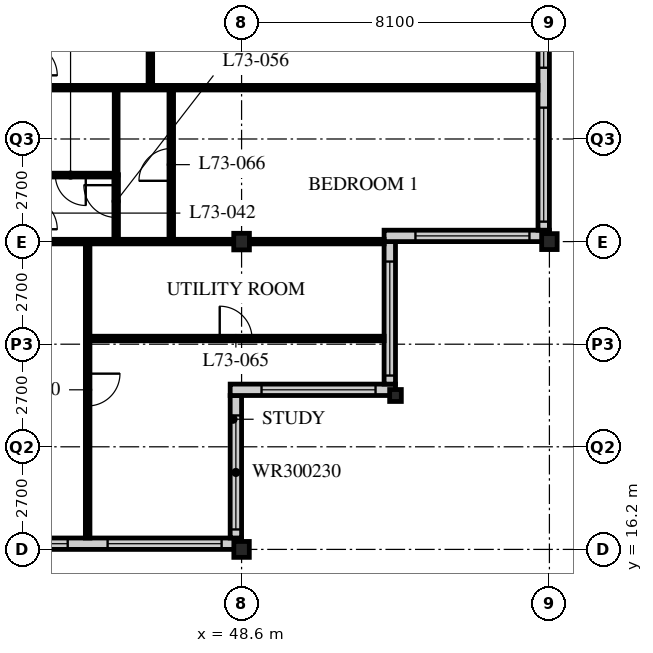
"""IFC4 building model, lengths in metres.
Left out: names, types, materials, properties, quantities, classifications, styles, units other than length and angle.
Written with IfcOpenShell. Run it as: python <this file> out.ifc"""

import sys

from ifc_helpers import new_model, si_unit, direction, frame, frame_2d, origin, origin_2d, place, context, subcontext, project, spatial, rectangle, i_section, extrude, element, fill, save


model = new_model("IFC4")
c1 = context("Model", 3, precision=1e-05, world=origin(), true_north=direction((0.0, 1.0)))
c2 = subcontext(c1, "Body", "Model", "MODEL_VIEW")
j1 = project(units=[si_unit("LENGTHUNIT", "METRE"), si_unit("PLANEANGLEUNIT", "RADIAN")], contexts=[c1])
p1 = place(None, origin())
s1 = spatial("IfcSite", under=j1, at=p1, CompositionType="ELEMENT")
p2 = place(p1, origin())
s2 = spatial("IfcBuilding", under=s1, at=p2, CompositionType="ELEMENT")
p3 = place(p2, frame((0.0, 0.0, 285.3)))
s3 = spatial("IfcBuildingStorey", under=s2, at=p3, CompositionType="ELEMENT", Elevation=285.3)
p4 = place(p3, frame((48.6, 16.2, 0.0), z_axis=(0.0, 0.0, 1.0), x_axis=(1.0, 0.0, 0.0)))
e1 = element("IfcColumn", 1, at=p4, inside=s3, PredefinedType="COLUMN", context=c2, shape_type="SweptSolid", body=[
    extrude(i_section(OverallWidth=0.407, OverallDepth=0.419, WebThickness=0.031, FlangeThickness=0.049, FilletRadius=0.015, at=origin_2d()), origin(), (0.0, 0.0, 1.0), 3.9),
])
p5 = place(p3, frame((48.6, 24.3, 0.0), z_axis=(0.0, 0.0, 1.0), x_axis=(1.0, 0.0, 0.0)))
e2 = element("IfcColumn", 2, at=p5, inside=s3, PredefinedType="COLUMN", context=c2, shape_type="SweptSolid", body=[
    extrude(i_section(OverallWidth=0.412, OverallDepth=0.437, WebThickness=0.036, FlangeThickness=0.058, FilletRadius=0.015, at=origin_2d()), origin(), (0.0, 0.0, 1.0), 3.9),
])
p6 = place(p3, frame((52.65, 20.25, 0.0), z_axis=(0.0, 0.0, 1.0), x_axis=(1.0, 0.0, 0.0)))
e3 = element("IfcColumn", 3, at=p6, inside=s3, PredefinedType="COLUMN", context=c2, shape_type="SweptSolid", body=[
    extrude(i_section(OverallWidth=0.307, OverallDepth=0.314, WebThickness=0.012, FlangeThickness=0.019, FilletRadius=0.015, at=origin_2d()), origin(), (0.0, 0.0, 1.0), 3.9),
])
p7 = place(p3, frame((56.7, 24.3, 0.0), z_axis=(0.0, 0.0, 1.0), x_axis=(1.0, 0.0, 0.0)))
e4 = element("IfcColumn", 4, at=p7, inside=s3, PredefinedType="COLUMN", context=c2, shape_type="SweptSolid", body=[
    extrude(i_section(OverallWidth=0.407, OverallDepth=0.419, WebThickness=0.031, FlangeThickness=0.049, FilletRadius=0.015, at=origin_2d()), origin(), (0.0, 0.0, 1.0), 3.9),
])
p8 = place(p3, frame((8.4, 16.35, 0.0), z_axis=(0.0, 0.0, 1.0), x_axis=(1.0, 0.0, 0.0)))
e5 = element("IfcWall", 5, at=p8, inside=s3, PredefinedType="SOLIDWALL", context=c2, shape_type="SweptSolid", body=[
    extrude(rectangle(XDim=40.2, YDim=0.3, at=frame_2d((20.1, 0.0))), origin(), (0.0, 0.0, 1.0), 3.69),
])
p9 = place(p8, frame((0.225, 0.0, 0.6)))
e6 = element("IfcOpeningElement", 6, at=p9, cuts=e5, PredefinedType="OPENING", context=c2, shape_type="SweptSolid", body=[
    extrude(rectangle(XDim=3.0, YDim=2.4, at=frame_2d((1.5, 1.2))), frame((0.0, 0.16, 0.0), z_axis=(0.0, -1.0, 0.0), x_axis=(1.0, 0.0, 0.0)), (0.0, 0.0, 1.0), 0.32),
])
p10 = place(p8, frame((4.275, 0.0, 0.6)))
e7 = element("IfcOpeningElement", 7, at=p10, cuts=e5, PredefinedType="OPENING", context=c2, shape_type="SweptSolid", body=[
    extrude(rectangle(XDim=3.0, YDim=2.4, at=frame_2d((1.5, 1.2))), frame((0.0, 0.16, 0.0), z_axis=(0.0, -1.0, 0.0), x_axis=(1.0, 0.0, 0.0)), (0.0, 0.0, 1.0), 0.32),
])
p11 = place(p8, frame((8.325, 0.0, 0.6)))
e8 = element("IfcOpeningElement", 8, at=p11, cuts=e5, PredefinedType="OPENING", context=c2, shape_type="SweptSolid", body=[
    extrude(rectangle(XDim=3.0, YDim=2.4, at=frame_2d((1.5, 1.2))), frame((0.0, 0.16, 0.0), z_axis=(0.0, -1.0, 0.0), x_axis=(1.0, 0.0, 0.0)), (0.0, 0.0, 1.0), 0.32),
])
p12 = place(p8, frame((12.375, 0.0, 0.6)))
e9 = element("IfcOpeningElement", 9, at=p12, cuts=e5, PredefinedType="OPENING", context=c2, shape_type="SweptSolid", body=[
    extrude(rectangle(XDim=3.0, YDim=2.4, at=frame_2d((1.5, 1.2))), frame((0.0, 0.16, 0.0), z_axis=(0.0, -1.0, 0.0), x_axis=(1.0, 0.0, 0.0)), (0.0, 0.0, 1.0), 0.32),
])
p13 = place(p8, frame((16.425, 0.0, 0.6)))
e10 = element("IfcOpeningElement", 10, at=p13, cuts=e5, PredefinedType="OPENING", context=c2, shape_type="SweptSolid", body=[
    extrude(rectangle(XDim=3.0, YDim=2.4, at=frame_2d((1.5, 1.2))), frame((0.0, 0.16, 0.0), z_axis=(0.0, -1.0, 0.0), x_axis=(1.0, 0.0, 0.0)), (0.0, 0.0, 1.0), 0.32),
])
p14 = place(p8, frame((20.475, 0.0, 0.6)))
e11 = element("IfcOpeningElement", 11, at=p14, cuts=e5, PredefinedType="OPENING", context=c2, shape_type="SweptSolid", body=[
    extrude(rectangle(XDim=3.0, YDim=2.4, at=frame_2d((1.5, 1.2))), frame((0.0, 0.16, 0.0), z_axis=(0.0, -1.0, 0.0), x_axis=(1.0, 0.0, 0.0)), (0.0, 0.0, 1.0), 0.32),
])
p15 = place(p8, frame((24.525, 0.0, 0.6)))
e12 = element("IfcOpeningElement", 12, at=p15, cuts=e5, PredefinedType="OPENING", context=c2, shape_type="SweptSolid", body=[
    extrude(rectangle(XDim=3.0, YDim=2.4, at=frame_2d((1.5, 1.2))), frame((0.0, 0.16, 0.0), z_axis=(0.0, -1.0, 0.0), x_axis=(1.0, 0.0, 0.0)), (0.0, 0.0, 1.0), 0.32),
])
p16 = place(p8, frame((28.575, 0.0, 0.6)))
e13 = element("IfcOpeningElement", 13, at=p16, cuts=e5, PredefinedType="OPENING", context=c2, shape_type="SweptSolid", body=[
    extrude(rectangle(XDim=3.0, YDim=2.4, at=frame_2d((1.5, 1.2))), frame((0.0, 0.16, 0.0), z_axis=(0.0, -1.0, 0.0), x_axis=(1.0, 0.0, 0.0)), (0.0, 0.0, 1.0), 0.32),
])
p17 = place(p8, frame((32.625, 0.0, 0.6)))
e14 = element("IfcOpeningElement", 14, at=p17, cuts=e5, PredefinedType="OPENING", context=c2, shape_type="SweptSolid", body=[
    extrude(rectangle(XDim=3.0, YDim=2.4, at=frame_2d((1.5, 1.2))), frame((0.0, 0.16, 0.0), z_axis=(0.0, -1.0, 0.0), x_axis=(1.0, 0.0, 0.0)), (0.0, 0.0, 1.0), 0.32),
])
p18 = place(p8, frame((36.675, 0.0, 0.6)))
e15 = element("IfcOpeningElement", 15, at=p18, cuts=e5, PredefinedType="OPENING", context=c2, shape_type="SweptSolid", body=[
    extrude(rectangle(XDim=3.0, YDim=2.4, at=frame_2d((1.5, 1.2))), frame((0.0, 0.16, 0.0), z_axis=(0.0, -1.0, 0.0), x_axis=(1.0, 0.0, 0.0)), (0.0, 0.0, 1.0), 0.32),
])
p19 = place(p3, frame((48.45, 16.5, 0.0), z_axis=(0.0, 0.0, 1.0), x_axis=(0.0, 1.0, 0.0)))
e16 = element("IfcWall", 16, at=p19, inside=s3, PredefinedType="SOLIDWALL", context=c2, shape_type="SweptSolid", body=[
    extrude(rectangle(XDim=3.75, YDim=0.3, at=frame_2d((1.875, 0.0))), origin(), (0.0, 0.0, 1.0), 3.69),
])
p20 = place(p19, frame((0.225, 0.0, 0.6)))
e17 = element("IfcOpeningElement", 17, at=p20, cuts=e16, PredefinedType="OPENING", context=c2, shape_type="SweptSolid", body=[
    extrude(rectangle(XDim=3.0, YDim=2.3, at=frame_2d((1.5, 1.15))), frame((0.0, 0.16, 0.0), z_axis=(0.0, -1.0, 0.0), x_axis=(1.0, 0.0, 0.0)), (0.0, 0.0, 1.0), 0.32),
])
p21 = place(p3, frame((48.3, 20.4, 0.0), z_axis=(0.0, 0.0, 1.0), x_axis=(1.0, 0.0, 0.0)))
e18 = element("IfcWall", 18, at=p21, inside=s3, PredefinedType="SOLIDWALL", context=c2, shape_type="SweptSolid", body=[
    extrude(rectangle(XDim=4.35, YDim=0.3, at=frame_2d((2.175, 0.0))), origin(), (0.0, 0.0, 1.0), 3.69),
])
p22 = place(p21, frame((0.825, 0.0, 0.6)))
e19 = element("IfcOpeningElement", 19, at=p22, cuts=e18, PredefinedType="OPENING", context=c2, shape_type="SweptSolid", body=[
    extrude(rectangle(XDim=3.0, YDim=2.3, at=frame_2d((1.5, 1.15))), frame((0.0, 0.16, 0.0), z_axis=(0.0, -1.0, 0.0), x_axis=(1.0, 0.0, 0.0)), (0.0, 0.0, 1.0), 0.32),
])
p23 = place(p3, frame((52.5, 20.55, 0.0), z_axis=(0.0, 0.0, 1.0), x_axis=(0.0, 1.0, 0.0)))
e20 = element("IfcWall", 20, at=p23, inside=s3, PredefinedType="SOLIDWALL", context=c2, shape_type="SweptSolid", body=[
    extrude(rectangle(XDim=3.75, YDim=0.3, at=frame_2d((1.875, 0.0))), origin(), (0.0, 0.0, 1.0), 3.69),
])
p24 = place(p23, frame((0.225, 0.0, 0.6)))
e21 = element("IfcOpeningElement", 21, at=p24, cuts=e20, PredefinedType="OPENING", context=c2, shape_type="SweptSolid", body=[
    extrude(rectangle(XDim=3.0, YDim=2.3, at=frame_2d((1.5, 1.15))), frame((0.0, 0.16, 0.0), z_axis=(0.0, -1.0, 0.0), x_axis=(1.0, 0.0, 0.0)), (0.0, 0.0, 1.0), 0.32),
])
p25 = place(p3, frame((52.35, 24.45, 0.0), z_axis=(0.0, 0.0, 1.0), x_axis=(1.0, 0.0, 0.0)))
e22 = element("IfcWall", 22, at=p25, inside=s3, PredefinedType="SOLIDWALL", context=c2, shape_type="SweptSolid", body=[
    extrude(rectangle(XDim=4.35, YDim=0.3, at=frame_2d((2.175, 0.0))), origin(), (0.0, 0.0, 1.0), 3.69),
])
p26 = place(p25, frame((0.825, 0.0, 0.6)))
e23 = element("IfcOpeningElement", 23, at=p26, cuts=e22, PredefinedType="OPENING", context=c2, shape_type="SweptSolid", body=[
    extrude(rectangle(XDim=3.0, YDim=2.3, at=frame_2d((1.5, 1.15))), frame((0.0, 0.16, 0.0), z_axis=(0.0, -1.0, 0.0), x_axis=(1.0, 0.0, 0.0)), (0.0, 0.0, 1.0), 0.32),
])
p27 = place(p3, frame((56.55, 24.6, 0.0), z_axis=(0.0, 0.0, 1.0), x_axis=(0.0, 1.0, 0.0)))
e24 = element("IfcWall", 24, at=p27, inside=s3, PredefinedType="SOLIDWALL", context=c2, shape_type="SweptSolid", body=[
    extrude(rectangle(XDim=32.1, YDim=0.3, at=frame_2d((16.05, 0.0))), origin(), (0.0, 0.0, 1.0), 3.69),
])
p28 = place(p27, frame((0.225, 0.0, 0.6)))
e25 = element("IfcOpeningElement", 25, at=p28, cuts=e24, PredefinedType="OPENING", context=c2, shape_type="SweptSolid", body=[
    extrude(rectangle(XDim=3.0, YDim=2.4, at=frame_2d((1.5, 1.2))), frame((0.0, 0.16, 0.0), z_axis=(0.0, -1.0, 0.0), x_axis=(1.0, 0.0, 0.0)), (0.0, 0.0, 1.0), 0.32),
])
p29 = place(p27, frame((4.275, 0.0, 0.6)))
e26 = element("IfcOpeningElement", 26, at=p29, cuts=e24, PredefinedType="OPENING", context=c2, shape_type="SweptSolid", body=[
    extrude(rectangle(XDim=3.0, YDim=2.4, at=frame_2d((1.5, 1.2))), frame((0.0, 0.16, 0.0), z_axis=(0.0, -1.0, 0.0), x_axis=(1.0, 0.0, 0.0)), (0.0, 0.0, 1.0), 0.32),
])
p30 = place(p27, frame((8.325, 0.0, 0.6)))
e27 = element("IfcOpeningElement", 27, at=p30, cuts=e24, PredefinedType="OPENING", context=c2, shape_type="SweptSolid", body=[
    extrude(rectangle(XDim=3.0, YDim=2.4, at=frame_2d((1.5, 1.2))), frame((0.0, 0.16, 0.0), z_axis=(0.0, -1.0, 0.0), x_axis=(1.0, 0.0, 0.0)), (0.0, 0.0, 1.0), 0.32),
])
p31 = place(p27, frame((12.375, 0.0, 0.6)))
e28 = element("IfcOpeningElement", 28, at=p31, cuts=e24, PredefinedType="OPENING", context=c2, shape_type="SweptSolid", body=[
    extrude(rectangle(XDim=3.0, YDim=2.4, at=frame_2d((1.5, 1.2))), frame((0.0, 0.16, 0.0), z_axis=(0.0, -1.0, 0.0), x_axis=(1.0, 0.0, 0.0)), (0.0, 0.0, 1.0), 0.32),
])
p32 = place(p27, frame((16.425, 0.0, 0.6)))
e29 = element("IfcOpeningElement", 29, at=p32, cuts=e24, PredefinedType="OPENING", context=c2, shape_type="SweptSolid", body=[
    extrude(rectangle(XDim=3.0, YDim=2.4, at=frame_2d((1.5, 1.2))), frame((0.0, 0.16, 0.0), z_axis=(0.0, -1.0, 0.0), x_axis=(1.0, 0.0, 0.0)), (0.0, 0.0, 1.0), 0.32),
])
p33 = place(p27, frame((20.475, 0.0, 0.6)))
e30 = element("IfcOpeningElement", 30, at=p33, cuts=e24, PredefinedType="OPENING", context=c2, shape_type="SweptSolid", body=[
    extrude(rectangle(XDim=3.0, YDim=2.4, at=frame_2d((1.5, 1.2))), frame((0.0, 0.16, 0.0), z_axis=(0.0, -1.0, 0.0), x_axis=(1.0, 0.0, 0.0)), (0.0, 0.0, 1.0), 0.32),
])
p34 = place(p27, frame((24.525, 0.0, 0.6)))
e31 = element("IfcOpeningElement", 31, at=p34, cuts=e24, PredefinedType="OPENING", context=c2, shape_type="SweptSolid", body=[
    extrude(rectangle(XDim=3.0, YDim=2.4, at=frame_2d((1.5, 1.2))), frame((0.0, 0.16, 0.0), z_axis=(0.0, -1.0, 0.0), x_axis=(1.0, 0.0, 0.0)), (0.0, 0.0, 1.0), 0.32),
])
p35 = place(p27, frame((28.575, 0.0, 0.6)))
e32 = element("IfcOpeningElement", 32, at=p35, cuts=e24, PredefinedType="OPENING", context=c2, shape_type="SweptSolid", body=[
    extrude(rectangle(XDim=3.0, YDim=2.4, at=frame_2d((1.5, 1.2))), frame((0.0, 0.16, 0.0), z_axis=(0.0, -1.0, 0.0), x_axis=(1.0, 0.0, 0.0)), (0.0, 0.0, 1.0), 0.32),
])
p36 = place(p3, frame((42.9, 24.3, 0.0), z_axis=(0.0, 0.0, 1.0), x_axis=(1.0, 0.0, 0.0)))
e33 = element("IfcWall", 33, at=p36, inside=s3, PredefinedType="PARTITIONING", context=c2, shape_type="SweptSolid", body=[
    extrude(rectangle(XDim=9.45, YDim=0.12, at=frame_2d((4.725, 0.0))), origin(), (0.0, 0.0, 1.0), 3.078),
])
p37 = place(p3, frame((44.55, 16.5, 0.0), z_axis=(0.0, 0.0, 1.0), x_axis=(0.0, 1.0, 0.0)))
e34 = element("IfcWall", 34, at=p37, inside=s3, PredefinedType="PARTITIONING", context=c2, shape_type="SweptSolid", body=[
    extrude(rectangle(XDim=7.8, YDim=0.12, at=frame_2d((3.9, 0.0))), origin(), (0.0, 0.0, 1.0), 3.69),
])
p38 = place(p37, frame((3.475, 0.0, 0.0)))
e35 = element("IfcOpeningElement", 35, at=p38, cuts=e34, PredefinedType="OPENING", context=c2, shape_type="SweptSolid", body=[
    extrude(rectangle(XDim=0.85, YDim=2.1, at=frame_2d((0.425, 1.05))), frame((0.0, 0.07, 0.0), z_axis=(0.0, -1.0, 0.0), x_axis=(1.0, 0.0, 0.0)), (0.0, 0.0, 1.0), 0.14),
])
p39 = place(p3, frame((42.9, 26.05, 0.0), z_axis=(0.0, 0.0, 1.0), x_axis=(1.0, 0.0, 0.0)))
e36 = element("IfcWall", 36, at=p39, inside=s3, PredefinedType="PARTITIONING", context=c2, shape_type="SweptSolid", body=[
    extrude(rectangle(XDim=2.4, YDim=0.1, at=frame_2d((1.2, 0.0))), origin(), (0.0, 0.0, 1.0), 3.69),
])
p40 = place(p39, frame((0.8, 0.0, 0.0)))
e37 = element("IfcOpeningElement", 37, at=p40, cuts=e36, PredefinedType="OPENING", context=c2, shape_type="SweptSolid", body=[
    extrude(rectangle(XDim=0.8, YDim=2.1, at=frame_2d((0.4, 1.05))), frame((0.0, 0.06, 0.0), z_axis=(0.0, -1.0, 0.0), x_axis=(1.0, 0.0, 0.0)), (0.0, 0.0, 1.0), 0.12),
])
p41 = place(p3, frame((45.3, 26.05, 0.0), z_axis=(0.0, 0.0, 1.0), x_axis=(0.0, 1.0, 0.0)))
e38 = element("IfcWall", 38, at=p41, inside=s3, PredefinedType="PARTITIONING", context=c2, shape_type="SweptSolid", body=[
    extrude(rectangle(XDim=2.3, YDim=0.1, at=frame_2d((1.15, 0.0))), origin(), (0.0, 0.0, 1.0), 3.69),
])
p42 = place(p3, frame((42.9, 28.35, 0.0), z_axis=(0.0, 0.0, 1.0), x_axis=(1.0, 0.0, 0.0)))
e39 = element("IfcWall", 39, at=p42, inside=s3, PredefinedType="PARTITIONING", context=c2, shape_type="SweptSolid", body=[
    extrude(rectangle(XDim=13.5, YDim=0.12, at=frame_2d((6.75, 0.0))), origin(), (0.0, 0.0, 1.0), 3.69),
])
p43 = place(p3, frame((45.3, 24.3, 0.0), z_axis=(0.0, 0.0, 1.0), x_axis=(0.0, 1.0, 0.0)))
e40 = element("IfcWall", 40, at=p43, inside=s3, PredefinedType="PARTITIONING", context=c2, shape_type="SweptSolid", body=[
    extrude(rectangle(XDim=1.76, YDim=0.12, at=frame_2d((0.88, 0.0))), origin(), (0.0, 0.0, 1.0), 3.69),
])
p44 = place(p43, frame((0.635, 0.0, 0.0)))
e41 = element("IfcOpeningElement", 41, at=p44, cuts=e40, PredefinedType="OPENING", context=c2, shape_type="SweptSolid", body=[
    extrude(rectangle(XDim=0.85, YDim=2.1, at=frame_2d((0.425, 1.05))), frame((0.0, 0.07, 0.0), z_axis=(0.0, -1.0, 0.0), x_axis=(1.0, 0.0, 0.0)), (0.0, 0.0, 1.0), 0.14),
])
p45 = place(p3, frame((44.55, 21.75, 0.0), z_axis=(0.0, 0.0, 1.0), x_axis=(1.0, 0.0, 0.0)))
e42 = element("IfcWall", 42, at=p45, inside=s3, PredefinedType="PARTITIONING", context=c2, shape_type="SweptSolid", body=[
    extrude(rectangle(XDim=7.8, YDim=0.12, at=frame_2d((3.9, 0.0))), origin(), (0.0, 0.0, 1.0), 3.69),
])
p46 = place(p45, frame((3.475, 0.0, 0.0)))
e43 = element("IfcOpeningElement", 43, at=p46, cuts=e42, PredefinedType="OPENING", context=c2, shape_type="SweptSolid", body=[
    extrude(rectangle(XDim=0.85, YDim=2.1, at=frame_2d((0.425, 1.05))), frame((0.0, 0.07, 0.0), z_axis=(0.0, -1.0, 0.0), x_axis=(1.0, 0.0, 0.0)), (0.0, 0.0, 1.0), 0.14),
])
p47 = place(p3, frame((46.75, 24.3, 0.0), z_axis=(0.0, 0.0, 1.0), x_axis=(0.0, 1.0, 0.0)))
e44 = element("IfcWall", 44, at=p47, inside=s3, PredefinedType="PARTITIONING", context=c2, shape_type="SweptSolid", body=[
    extrude(rectangle(XDim=4.05, YDim=0.12, at=frame_2d((2.025, 0.0))), origin(), (0.0, 0.0, 1.0), 3.69),
])
p48 = place(p47, frame((1.6, 0.0, 0.0)))
e45 = element("IfcOpeningElement", 45, at=p48, cuts=e44, PredefinedType="OPENING", context=c2, shape_type="SweptSolid", body=[
    extrude(rectangle(XDim=0.85, YDim=2.1, at=frame_2d((0.425, 1.05))), frame((0.0, 0.07, 0.0), z_axis=(0.0, -1.0, 0.0), x_axis=(1.0, 0.0, 0.0)), (0.0, 0.0, 1.0), 0.14),
])
p49 = place(p3, frame((46.2, 28.35, 0.0), z_axis=(0.0, 0.0, 1.0), x_axis=(0.0, 1.0, 0.0)))
e46 = element("IfcWall", 46, at=p49, inside=s3, PredefinedType="PARTITIONING", context=c2, shape_type="SweptSolid", body=[
    extrude(rectangle(XDim=12.15, YDim=0.12, at=frame_2d((6.075, 0.0))), origin(), (0.0, 0.0, 1.0), 3.69),
])
p50 = place(p49, frame((1.6, 0.0, 0.0)))
e47 = element("IfcOpeningElement", 47, at=p50, cuts=e46, PredefinedType="OPENING", context=c2, shape_type="SweptSolid", body=[
    extrude(rectangle(XDim=0.85, YDim=2.1, at=frame_2d((0.425, 1.05))), frame((0.0, 0.07, 0.0), z_axis=(0.0, -1.0, 0.0), x_axis=(1.0, 0.0, 0.0)), (0.0, 0.0, 1.0), 0.14),
])
p51 = place(p49, frame((5.65, 0.0, 0.0)))
e48 = element("IfcOpeningElement", 48, at=p51, cuts=e46, PredefinedType="OPENING", context=c2, shape_type="SweptSolid", body=[
    extrude(rectangle(XDim=0.85, YDim=2.1, at=frame_2d((0.425, 1.05))), frame((0.0, 0.07, 0.0), z_axis=(0.0, -1.0, 0.0), x_axis=(1.0, 0.0, 0.0)), (0.0, 0.0, 1.0), 0.14),
])
p52 = place(p49, frame((9.7, 0.0, 0.0)))
e49 = element("IfcOpeningElement", 49, at=p52, cuts=e46, PredefinedType="OPENING", context=c2, shape_type="SweptSolid", body=[
    extrude(rectangle(XDim=0.85, YDim=2.1, at=frame_2d((0.425, 1.05))), frame((0.0, 0.07, 0.0), z_axis=(0.0, -1.0, 0.0), x_axis=(1.0, 0.0, 0.0)), (0.0, 0.0, 1.0), 0.14),
])
p53 = place(p17, origin())
e50 = element("IfcWindow", 50, at=p53, inside=s3, PartitioningType="SINGLE_PANEL", PredefinedType="WINDOW", context=c2, shape_type="SweptSolid", body=[
    extrude(rectangle(XDim=3.0, YDim=2.4, at=frame_2d((1.5, 1.2))), frame((0.0, 0.03, 0.0), z_axis=(0.0, -1.0, 0.0), x_axis=(1.0, 0.0, 0.0)), (0.0, 0.0, 1.0), 0.06),
])
fill(e14, e50)
p54 = place(p18, origin())
e51 = element("IfcWindow", 51, at=p54, inside=s3, PartitioningType="SINGLE_PANEL", PredefinedType="WINDOW", context=c2, shape_type="SweptSolid", body=[
    extrude(rectangle(XDim=3.0, YDim=2.4, at=frame_2d((1.5, 1.2))), frame((0.0, 0.03, 0.0), z_axis=(0.0, -1.0, 0.0), x_axis=(1.0, 0.0, 0.0)), (0.0, 0.0, 1.0), 0.06),
])
fill(e15, e51)
p55 = place(p20, origin())
e52 = element("IfcWindow", 52, at=p55, inside=s3, PartitioningType="SINGLE_PANEL", PredefinedType="WINDOW", context=c2, shape_type="SweptSolid", body=[
    extrude(rectangle(XDim=3.0, YDim=2.3, at=frame_2d((1.5, 1.15))), frame((0.0, 0.03, 0.0), z_axis=(0.0, -1.0, 0.0), x_axis=(1.0, 0.0, 0.0)), (0.0, 0.0, 1.0), 0.06),
])
fill(e17, e52)
p56 = place(p22, origin())
e53 = element("IfcWindow", 53, at=p56, inside=s3, PartitioningType="SINGLE_PANEL", PredefinedType="WINDOW", context=c2, shape_type="SweptSolid", body=[
    extrude(rectangle(XDim=3.0, YDim=2.3, at=frame_2d((1.5, 1.15))), frame((0.0, 0.03, 0.0), z_axis=(0.0, -1.0, 0.0), x_axis=(1.0, 0.0, 0.0)), (0.0, 0.0, 1.0), 0.06),
])
fill(e19, e53)
p57 = place(p24, origin())
e54 = element("IfcWindow", 54, at=p57, inside=s3, PartitioningType="SINGLE_PANEL", PredefinedType="WINDOW", context=c2, shape_type="SweptSolid", body=[
    extrude(rectangle(XDim=3.0, YDim=2.3, at=frame_2d((1.5, 1.15))), frame((0.0, 0.03, 0.0), z_axis=(0.0, -1.0, 0.0), x_axis=(1.0, 0.0, 0.0)), (0.0, 0.0, 1.0), 0.06),
])
fill(e21, e54)
p58 = place(p26, origin())
e55 = element("IfcWindow", 55, at=p58, inside=s3, PartitioningType="SINGLE_PANEL", PredefinedType="WINDOW", context=c2, shape_type="SweptSolid", body=[
    extrude(rectangle(XDim=3.0, YDim=2.3, at=frame_2d((1.5, 1.15))), frame((0.0, 0.03, 0.0), z_axis=(0.0, -1.0, 0.0), x_axis=(1.0, 0.0, 0.0)), (0.0, 0.0, 1.0), 0.06),
])
fill(e23, e55)
p59 = place(p28, origin())
e56 = element("IfcWindow", 56, at=p59, inside=s3, PartitioningType="SINGLE_PANEL", PredefinedType="WINDOW", context=c2, shape_type="SweptSolid", body=[
    extrude(rectangle(XDim=3.0, YDim=2.4, at=frame_2d((1.5, 1.2))), frame((0.0, 0.03, 0.0), z_axis=(0.0, -1.0, 0.0), x_axis=(1.0, 0.0, 0.0)), (0.0, 0.0, 1.0), 0.06),
])
fill(e25, e56)
p60 = place(p29, origin())
e57 = element("IfcWindow", 57, at=p60, inside=s3, PartitioningType="SINGLE_PANEL", PredefinedType="WINDOW", context=c2, shape_type="SweptSolid", body=[
    extrude(rectangle(XDim=3.0, YDim=2.4, at=frame_2d((1.5, 1.2))), frame((0.0, 0.03, 0.0), z_axis=(0.0, -1.0, 0.0), x_axis=(1.0, 0.0, 0.0)), (0.0, 0.0, 1.0), 0.06),
])
fill(e26, e57)
p61 = place(p38, origin())
e58 = element("IfcDoor", 58, at=p61, inside=s3, OperationType="SINGLE_SWING_LEFT", PredefinedType="DOOR", context=c2, shape_type="SweptSolid", body=[
    extrude(rectangle(XDim=0.85, YDim=2.1, at=frame_2d((0.425, 1.05))), frame((0.0, 0.025, 0.0), z_axis=(0.0, -1.0, 0.0), x_axis=(1.0, 0.0, 0.0)), (0.0, 0.0, 1.0), 0.05),
])
fill(e35, e58)
p62 = place(p40, origin())
e59 = element("IfcDoor", 59, at=p62, inside=s3, OperationType="SINGLE_SWING_LEFT", PredefinedType="DOOR", context=c2, shape_type="SweptSolid", body=[
    extrude(rectangle(XDim=0.8, YDim=2.1, at=frame_2d((0.4, 1.05))), frame((0.0, 0.025, 0.0), z_axis=(0.0, -1.0, 0.0), x_axis=(1.0, 0.0, 0.0)), (0.0, 0.0, 1.0), 0.05),
])
fill(e37, e59)
p63 = place(p44, origin())
e60 = element("IfcDoor", 60, at=p63, inside=s3, OperationType="SINGLE_SWING_RIGHT", PredefinedType="DOOR", context=c2, shape_type="SweptSolid", body=[
    extrude(rectangle(XDim=0.85, YDim=2.1, at=frame_2d((0.425, 1.05))), frame((0.0, 0.025, 0.0), z_axis=(0.0, -1.0, 0.0), x_axis=(1.0, 0.0, 0.0)), (0.0, 0.0, 1.0), 0.05),
])
fill(e41, e60)
p64 = place(p46, origin())
e61 = element("IfcDoor", 61, at=p64, inside=s3, OperationType="SINGLE_SWING_LEFT", PredefinedType="DOOR", context=c2, shape_type="SweptSolid", body=[
    extrude(rectangle(XDim=0.85, YDim=2.1, at=frame_2d((0.425, 1.05))), frame((0.0, 0.025, 0.0), z_axis=(0.0, -1.0, 0.0), x_axis=(1.0, 0.0, 0.0)), (0.0, 0.0, 1.0), 0.05),
])
fill(e43, e61)
p65 = place(p48, origin())
e62 = element("IfcDoor", 62, at=p65, inside=s3, OperationType="SINGLE_SWING_LEFT", PredefinedType="DOOR", context=c2, shape_type="SweptSolid", body=[
    extrude(rectangle(XDim=0.85, YDim=2.1, at=frame_2d((0.425, 1.05))), frame((0.0, 0.025, 0.0), z_axis=(0.0, -1.0, 0.0), x_axis=(1.0, 0.0, 0.0)), (0.0, 0.0, 1.0), 0.05),
])
fill(e45, e62)
save(model, sys.argv[1])
